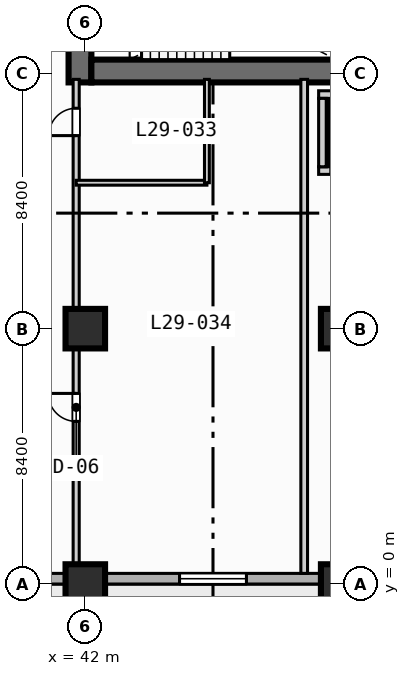
"""IFC4 building model, lengths in metres.
Left out: names, types, materials, properties, quantities, classifications, styles, units other than length and angle.
Written with IfcOpenShell. Run it as: python <this file> out.ifc"""

import sys

from ifc_helpers import new_model, si_unit, direction, frame, frame_2d, origin, origin_2d, place, context, subcontext, project, spatial, rectangle, extrude, element, fill, save


model = new_model("IFC4")
c1 = context("Model", 3, precision=1e-05, world=origin(), true_north=direction((0.0, 1.0)))
c2 = subcontext(c1, "Body", "Model", "MODEL_VIEW")
j1 = project(units=[si_unit("LENGTHUNIT", "METRE"), si_unit("PLANEANGLEUNIT", "RADIAN")], contexts=[c1])
p1 = place(None, origin())
s1 = spatial("IfcSite", under=j1, at=p1, CompositionType="ELEMENT")
p2 = place(p1, origin())
s2 = spatial("IfcBuilding", under=s1, at=p2, CompositionType="ELEMENT")
p3 = place(p2, frame((0.0, 0.0, 122.8)))
s3 = spatial("IfcBuildingStorey", under=s2, at=p3, CompositionType="ELEMENT", Elevation=122.8)
p4 = place(p3, frame((41.825, 16.5, 0.0), z_axis=(0.0, 0.0, 1.0), x_axis=(0.0, 1.0, 0.0)))
e1 = element("IfcWall", 1, at=p4, inside=s3, PredefinedType="SHEAR", context=c2, shape_type="SweptSolid", body=[
    extrude(rectangle(XDim=1.5, YDim=0.75, at=frame_2d((0.75, 0.0))), origin(), (0.0, 0.0, 1.0), 3.55),
])
p5 = place(p3, frame((42.2, 16.875, 0.0), z_axis=(0.0, 0.0, 1.0), x_axis=(1.0, 0.0, 0.0)))
e2 = element("IfcWall", 2, at=p5, inside=s3, PredefinedType="SHEAR", context=c2, shape_type="SweptSolid", body=[
    extrude(rectangle(XDim=16.35, YDim=0.75, at=frame_2d((8.175, 0.0))), origin(), (0.0, 0.0, 1.0), 3.55),
])
for number, where, z_axis, x_axis in (
    (3, (42.0, 0.0, 0.0), (0.0, 0.0, 1.0), (1.0, 0.0, 0.0)),
    (4, (42.0, 8.4, 0.0), (0.0, 0.0, 1.0), (1.0, 0.0, 0.0)),
    (5, (50.4, 0.0, 0.0), (0.0, 0.0, 1.0), (1.0, 0.0, 0.0)),
    (6, (50.4, 8.4, 0.0), (0.0, 0.0, 1.0), (1.0, 0.0, 0.0)),
):
    element("IfcColumn", number, at=place(p3, frame(where, z_axis=z_axis, x_axis=x_axis)), inside=s3, PredefinedType="COLUMN", context=c2, shape_type="SweptSolid", body=[
        extrude(rectangle(XDim=1.3, YDim=1.3, at=origin_2d()), origin(), (0.0, 0.0, 1.0), 3.8),
    ])
p6 = place(p3, frame((72.425, 0.175, 0.0), z_axis=(0.0, 0.0, 1.0), x_axis=(-1.0, 0.0, 0.0)))
e7 = element("IfcWall", 7, at=p6, inside=s3, PredefinedType="STANDARD", context=c2, shape_type="SweptSolid", body=[
    extrude(rectangle(XDim=69.25, YDim=0.35, at=frame_2d((34.625, 0.0))), origin(), (0.0, 0.0, 1.0), 3.55),
])
p7 = place(p6, frame((50.725, 0.0, 0.0)))
e8 = element("IfcOpeningElement", 8, at=p7, cuts=e7, PredefinedType="OPENING", context=c2, shape_type="SweptSolid", body=[
    extrude(rectangle(XDim=1.4, YDim=2.2, at=frame_2d((0.7, 1.1))), frame((0.0, 0.185, 0.0), z_axis=(0.0, -1.0, 0.0), x_axis=(1.0, 0.0, 0.0)), (0.0, 0.0, 1.0), 0.37),
])
p8 = place(p6, frame((58.725, 0.0, 0.85)))
e9 = element("IfcOpeningElement", 9, at=p8, cuts=e7, PredefinedType="OPENING", context=c2, shape_type="SweptSolid", body=[
    extrude(rectangle(XDim=2.2, YDim=1.8, at=frame_2d((1.1, 0.9))), frame((0.0, 0.185, 0.0), z_axis=(0.0, -1.0, 0.0), x_axis=(1.0, 0.0, 0.0)), (0.0, 0.0, 1.0), 0.37),
])
p9 = place(p6, frame((41.925, 0.0, 0.85)))
e10 = element("IfcOpeningElement", 10, at=p9, cuts=e7, PredefinedType="OPENING", context=c2, shape_type="SweptSolid", body=[
    extrude(rectangle(XDim=2.2, YDim=1.8, at=frame_2d((1.1, 0.9))), frame((0.0, 0.185, 0.0), z_axis=(0.0, -1.0, 0.0), x_axis=(1.0, 0.0, 0.0)), (0.0, 0.0, 1.0), 0.37),
])
p10 = place(p6, frame((33.525, 0.0, 0.85)))
e11 = element("IfcOpeningElement", 11, at=p10, cuts=e7, PredefinedType="OPENING", context=c2, shape_type="SweptSolid", body=[
    extrude(rectangle(XDim=2.2, YDim=1.8, at=frame_2d((1.1, 0.9))), frame((0.0, 0.185, 0.0), z_axis=(0.0, -1.0, 0.0), x_axis=(1.0, 0.0, 0.0)), (0.0, 0.0, 1.0), 0.37),
])
p11 = place(p6, frame((25.125, 0.0, 0.85)))
e12 = element("IfcOpeningElement", 12, at=p11, cuts=e7, PredefinedType="OPENING", context=c2, shape_type="SweptSolid", body=[
    extrude(rectangle(XDim=2.2, YDim=1.8, at=frame_2d((1.1, 0.9))), frame((0.0, 0.185, 0.0), z_axis=(0.0, -1.0, 0.0), x_axis=(1.0, 0.0, 0.0)), (0.0, 0.0, 1.0), 0.37),
])
p12 = place(p6, frame((64.825, 0.0, 0.85)))
e13 = element("IfcOpeningElement", 13, at=p12, cuts=e7, PredefinedType="OPENING", context=c2, shape_type="SweptSolid", body=[
    extrude(rectangle(XDim=1.8, YDim=1.8, at=frame_2d((0.9, 0.9))), frame((0.0, 0.185, 0.0), z_axis=(0.0, -1.0, 0.0), x_axis=(1.0, 0.0, 0.0)), (0.0, 0.0, 1.0), 0.37),
])
p13 = place(p6, frame((48.025, 0.0, 0.85)))
e14 = element("IfcOpeningElement", 14, at=p13, cuts=e7, PredefinedType="OPENING", context=c2, shape_type="SweptSolid", body=[
    extrude(rectangle(XDim=1.8, YDim=1.8, at=frame_2d((0.9, 0.9))), frame((0.0, 0.185, 0.0), z_axis=(0.0, -1.0, 0.0), x_axis=(1.0, 0.0, 0.0)), (0.0, 0.0, 1.0), 0.37),
])
p14 = place(p3, frame((49.675, 13.6, 0.0), z_axis=(0.0, 0.0, 1.0), x_axis=(1.0, 0.0, 0.0)))
e15 = element("IfcWall", 15, at=p14, inside=s3, PredefinedType="SOLIDWALL", context=c2, shape_type="SweptSolid", body=[
    extrude(rectangle(XDim=2.25, YDim=0.25, at=frame_2d((1.125, 0.0))), origin(), (0.0, 0.0, 1.0), 3.55),
])
p15 = place(p14, frame((0.4, 0.0, 0.0)))
e16 = element("IfcOpeningElement", 16, at=p15, cuts=e15, PredefinedType="OPENING", context=c2, shape_type="SweptSolid", body=[
    extrude(rectangle(XDim=1.1, YDim=2.15, at=frame_2d((0.55, 1.075))), frame((0.0, 0.135, 0.0), z_axis=(0.0, -1.0, 0.0), x_axis=(1.0, 0.0, 0.0)), (0.0, 0.0, 1.0), 0.27),
])
for number, where, z_axis, x_axis in (
    (17, (49.675, 16.1, 0.0), (0.0, 0.0, 1.0), (1.0, 0.0, 0.0)),
    (18, (49.8, 13.725, 0.0), (0.0, 0.0, 1.0), (0.0, 1.0, 0.0)),
):
    element("IfcWall", number, at=place(p3, frame(where, z_axis=z_axis, x_axis=x_axis)), inside=s3, PredefinedType="SOLIDWALL", context=c2, shape_type="SweptSolid", body=[
        extrude(rectangle(XDim=2.25, YDim=0.25, at=frame_2d((1.125, 0.0))), origin(), (0.0, 0.0, 1.0), 3.55),
    ])
p16 = place(p3, frame((41.7, 0.35, 0.0), z_axis=(0.0, 0.0, 1.0), x_axis=(0.0, 1.0, 0.0)))
e19 = element("IfcWall", 19, at=p16, inside=s3, PredefinedType="PARTITIONING", context=c2, shape_type="SweptSolid", body=[
    extrude(rectangle(XDim=16.25, YDim=0.2, at=frame_2d((8.125, 0.0))), origin(), (0.0, 0.0, 1.0), 2.8),
])
p17 = place(p16, frame((5.0, 0.0, 0.0)))
e20 = element("IfcOpeningElement", 20, at=p17, cuts=e19, PredefinedType="OPENING", context=c2, shape_type="SweptSolid", body=[
    extrude(rectangle(XDim=0.92, YDim=2.1, at=frame_2d((0.46, 1.05))), frame((0.0, 0.11, 0.0), z_axis=(0.0, -1.0, 0.0), x_axis=(1.0, 0.0, 0.0)), (0.0, 0.0, 1.0), 0.22),
])
p18 = place(p16, frame((14.4, 0.0, 0.0)))
e21 = element("IfcOpeningElement", 21, at=p18, cuts=e19, PredefinedType="OPENING", context=c2, shape_type="SweptSolid", body=[
    extrude(rectangle(XDim=0.9, YDim=2.1, at=frame_2d((0.45, 1.05))), frame((0.0, 0.11, 0.0), z_axis=(0.0, -1.0, 0.0), x_axis=(1.0, 0.0, 0.0)), (0.0, 0.0, 1.0), 0.22),
])
p19 = place(p3, frame((49.2, 0.35, 0.0), z_axis=(0.0, 0.0, 1.0), x_axis=(0.0, 1.0, 0.0)))
e22 = element("IfcWall", 22, at=p19, inside=s3, PredefinedType="PARTITIONING", context=c2, shape_type="SweptSolid", body=[
    extrude(rectangle(XDim=16.25, YDim=0.22, at=frame_2d((8.125, 0.0))), origin(), (0.0, 0.0, 1.0), 3.55),
])
p20 = place(p3, frame((41.7, 13.2, 0.0), z_axis=(0.0, 0.0, 1.0), x_axis=(1.0, 0.0, 0.0)))
e23 = element("IfcWall", 23, at=p20, inside=s3, PredefinedType="PARTITIONING", context=c2, shape_type="SweptSolid", body=[
    extrude(rectangle(XDim=4.3, YDim=0.16, at=frame_2d((2.15, 0.0))), origin(), (0.0, 0.0, 1.0), 3.55),
])
p21 = place(p3, frame((46.0, 13.2, 0.0), z_axis=(0.0, 0.0, 1.0), x_axis=(0.0, 1.0, 0.0)))
e24 = element("IfcWall", 24, at=p21, inside=s3, PredefinedType="PARTITIONING", context=c2, shape_type="SweptSolid", body=[
    extrude(rectangle(XDim=3.4, YDim=0.16, at=frame_2d((1.7, 0.0))), origin(), (0.0, 0.0, 1.0), 3.55),
])
p22 = place(p11, origin())
e25 = element("IfcWindow", 25, at=p22, inside=s3, PartitioningType="SINGLE_PANEL", PredefinedType="WINDOW", context=c2, shape_type="SweptSolid", body=[
    extrude(rectangle(XDim=2.2, YDim=1.8, at=frame_2d((1.1, 0.9))), frame((0.0, 0.03, 0.0), z_axis=(0.0, -1.0, 0.0), x_axis=(1.0, 0.0, 0.0)), (0.0, 0.0, 1.0), 0.06),
])
fill(e12, e25)
p23 = place(p17, origin())
e26 = element("IfcDoor", 26, at=p23, inside=s3, OperationType="SINGLE_SWING_RIGHT", PredefinedType="DOOR", context=c2, shape_type="SweptSolid", body=[
    extrude(rectangle(XDim=0.92, YDim=2.1, at=frame_2d((0.46, 1.05))), frame((0.0, 0.025, 0.0), z_axis=(0.0, -1.0, 0.0), x_axis=(1.0, 0.0, 0.0)), (0.0, 0.0, 1.0), 0.05),
])
fill(e20, e26)
p24 = place(p18, origin())
e27 = element("IfcDoor", 27, at=p24, inside=s3, OperationType="SINGLE_SWING_LEFT", PredefinedType="DOOR", context=c2, shape_type="SweptSolid", body=[
    extrude(rectangle(XDim=0.9, YDim=2.1, at=frame_2d((0.45, 1.05))), frame((0.0, 0.025, 0.0), z_axis=(0.0, -1.0, 0.0), x_axis=(1.0, 0.0, 0.0)), (0.0, 0.0, 1.0), 0.05),
])
fill(e21, e27)
save(model, sys.argv[1])
